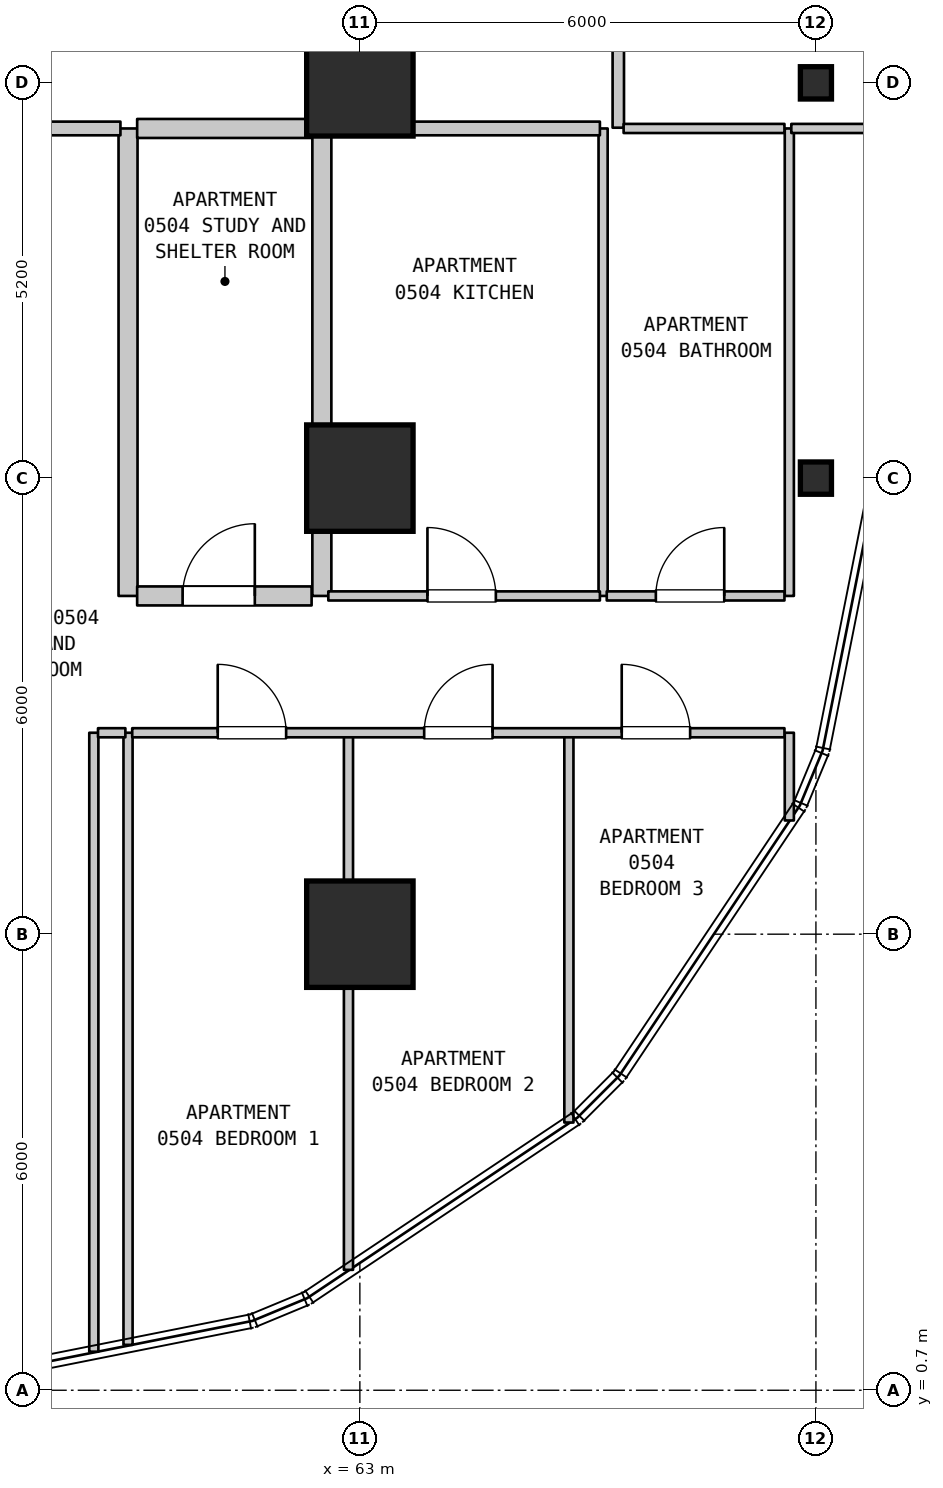
"""IFC4 building model, lengths in metres.
Left out: names, types, materials, properties, quantities, classifications, styles, units other than length and angle.
Written with IfcOpenShell. Run it as: python <this file> out.ifc"""

import sys

from ifc_helpers import new_model, si_unit, direction, frame, frame_2d, origin, origin_2d, place, context, subcontext, project, spatial, rectangle, i_section, extrude, element, fill, save


model = new_model("IFC4")
c1 = context("Model", 3, precision=1e-05, world=origin(), true_north=direction((0.0, 1.0)))
c2 = subcontext(c1, "Body", "Model", "MODEL_VIEW")
j1 = project(units=[si_unit("LENGTHUNIT", "METRE"), si_unit("PLANEANGLEUNIT", "RADIAN")], contexts=[c1])
p1 = place(None, origin())
s1 = spatial("IfcSite", under=j1, at=p1, CompositionType="ELEMENT")
p2 = place(p1, origin())
s2 = spatial("IfcBuilding", under=s1, at=p2, CompositionType="ELEMENT")
p3 = place(p2, frame((0.0, 0.0, 27.7)))
s3 = spatial("IfcBuildingStorey", under=s2, at=p3, CompositionType="ELEMENT", Elevation=27.7)
for number, where, z_axis, x_axis in (
    (1, (63.0, 6.7, 0.0), (0.0, 0.0, 1.0), (1.0, 0.0, 0.0)),
    (2, (63.0, 12.7, 0.0), (0.0, 0.0, 1.0), (1.0, 0.0, 0.0)),
    (3, (63.0, 17.9, 0.0), (0.0, 0.0, 1.0), (1.0, 0.0, 0.0)),
):
    element("IfcColumn", number, at=place(p3, frame(where, z_axis=z_axis, x_axis=x_axis)), inside=s3, PredefinedType="COLUMN", context=c2, shape_type="SweptSolid", body=[
        extrude(rectangle(XDim=1.4, YDim=1.4, at=origin_2d()), origin(), (0.0, 0.0, 1.0), 3.7),
    ])
for number, where, z_axis, x_axis in (
    (4, (69.0, 12.7, 0.0), (0.0, 0.0, 1.0), (1.0, 0.0, 0.0)),
    (5, (69.0, 17.9, 0.0), (0.0, 0.0, 1.0), (1.0, 0.0, 0.0)),
):
    element("IfcColumn", number, at=place(p3, frame(where, z_axis=z_axis, x_axis=x_axis)), inside=s3, PredefinedType="COLUMN", context=c2, shape_type="SweptSolid", body=[
        extrude(i_section(OverallWidth=0.409, OverallDepth=0.425, WebThickness=0.032, FlangeThickness=0.052, FilletRadius=0.015, at=origin_2d()), origin(), (0.0, 0.0, 1.0), 3.7),
    ])
p4 = place(p3, frame((59.5, 1.207, 0.0), z_axis=(0.0, 0.0, 1.0), x_axis=(0.0, 1.0, 0.0)))
e6 = element("IfcWall", 6, at=p4, inside=s3, PredefinedType="PARTITIONING", context=c2, shape_type="SweptSolid", body=[
    extrude(rectangle(XDim=8.143, YDim=0.12, at=frame_2d((4.072, 0.0))), origin(), (0.0, 0.0, 1.0), 3.385),
])
p5 = place(p3, frame((59.95, 1.297, 0.0), z_axis=(0.0, 0.0, 1.0), x_axis=(0.0, 1.0, 0.0)))
e7 = element("IfcWall", 7, at=p5, inside=s3, PredefinedType="PARTITIONING", context=c2, shape_type="SweptSolid", body=[
    extrude(rectangle(XDim=8.053, YDim=0.12, at=frame_2d((4.026, 0.0))), origin(), (0.0, 0.0, 1.0), 3.385),
])
for number, where, z_axis, x_axis in (
    (8, (59.95, 11.15, 0.0), (0.0, 0.0, 1.0), (0.0, 1.0, 0.0)),
    (9, (62.5, 11.15, 0.0), (0.0, 0.0, 1.0), (0.0, 1.0, 0.0)),
):
    element("IfcWall", number, at=place(p3, frame(where, z_axis=z_axis, x_axis=x_axis)), inside=s3, PredefinedType="STANDARD", context=c2, shape_type="SweptSolid", body=[
        extrude(rectangle(XDim=6.15, YDim=0.25, at=frame_2d((3.075, 0.0))), origin(), (0.0, 0.0, 1.0), 3.385),
    ])
p6 = place(p3, frame((62.85, 2.284, 0.0), z_axis=(0.0, 0.0, 1.0), x_axis=(0.0, 1.0, 0.0)))
e10 = element("IfcWall", 10, at=p6, inside=s3, PredefinedType="PARTITIONING", context=c2, shape_type="SweptSolid", body=[
    extrude(rectangle(XDim=7.066, YDim=0.12, at=frame_2d((3.533, 0.0))), origin(), (0.0, 0.0, 1.0), 3.385),
])
p7 = place(p3, frame((65.75, 4.222, 0.0), z_axis=(0.0, 0.0, 1.0), x_axis=(0.0, 1.0, 0.0)))
e11 = element("IfcWall", 11, at=p7, inside=s3, PredefinedType="PARTITIONING", context=c2, shape_type="SweptSolid", body=[
    extrude(rectangle(XDim=5.128, YDim=0.12, at=frame_2d((2.564, 0.0))), origin(), (0.0, 0.0, 1.0), 3.385),
])
p8 = place(p3, frame((66.2, 11.15, 0.0), z_axis=(0.0, 0.0, 1.0), x_axis=(0.0, 1.0, 0.0)))
e12 = element("IfcWall", 12, at=p8, inside=s3, PredefinedType="PARTITIONING", context=c2, shape_type="SweptSolid", body=[
    extrude(rectangle(XDim=6.15, YDim=0.12, at=frame_2d((3.075, 0.0))), origin(), (0.0, 0.0, 1.0), 3.385),
])
p9 = place(p3, frame((66.4, 17.31, 0.0), z_axis=(0.0, 0.0, 1.0), x_axis=(0.0, 1.0, 0.0)))
e13 = element("IfcWall", 13, at=p9, inside=s3, PredefinedType="STANDARD", context=c2, shape_type="SweptSolid", body=[
    extrude(rectangle(XDim=2.34, YDim=0.15, at=frame_2d((1.17, 0.0))), origin(), (0.0, 0.0, 1.0), 3.385),
])
p10 = place(p3, frame((68.65, 8.196, 0.0), z_axis=(0.0, 0.0, 1.0), x_axis=(0.0, 1.0, 0.0)))
e14 = element("IfcWall", 14, at=p10, inside=s3, PredefinedType="PARTITIONING", context=c2, shape_type="SweptSolid", body=[
    extrude(rectangle(XDim=1.154, YDim=0.12, at=frame_2d((0.577, 0.0))), origin(), (0.0, 0.0, 1.0), 3.385),
])
p11 = place(p3, frame((68.65, 11.15, 0.0), z_axis=(0.0, 0.0, 1.0), x_axis=(0.0, 1.0, 0.0)))
e15 = element("IfcWall", 15, at=p11, inside=s3, PredefinedType="PARTITIONING", context=c2, shape_type="SweptSolid", body=[
    extrude(rectangle(XDim=6.15, YDim=0.12, at=frame_2d((3.075, 0.0))), origin(), (0.0, 0.0, 1.0), 3.385),
])
p12 = place(p3, frame((59.555, 9.35, 0.0), z_axis=(0.0, 0.0, 1.0), x_axis=(1.0, 0.0, 0.0)))
e16 = element("IfcWall", 16, at=p12, inside=s3, PredefinedType="PARTITIONING", context=c2, shape_type="SweptSolid", body=[
    extrude(rectangle(XDim=0.36, YDim=0.12, at=frame_2d((0.18, 0.0))), origin(), (0.0, 0.0, 1.0), 3.385),
])
p13 = place(p3, frame((60.005, 9.35, 0.0), z_axis=(0.0, 0.0, 1.0), x_axis=(1.0, 0.0, 0.0)))
e17 = element("IfcWall", 17, at=p13, inside=s3, PredefinedType="PARTITIONING", context=c2, shape_type="SweptSolid", body=[
    extrude(rectangle(XDim=8.581, YDim=0.12, at=frame_2d((4.291, 0.0))), origin(), (0.0, 0.0, 1.0), 3.385),
])
p14 = place(p13, frame((1.125, 0.0, 0.0)))
e18 = element("IfcOpeningElement", 18, at=p14, cuts=e17, PredefinedType="OPENING", context=c2, shape_type="SweptSolid", body=[
    extrude(rectangle(XDim=0.9, YDim=2.15, at=frame_2d((0.45, 1.075))), frame((0.0, 0.07, 0.0), z_axis=(0.0, -1.0, 0.0), x_axis=(1.0, 0.0, 0.0)), (0.0, 0.0, 1.0), 0.14),
])
p15 = place(p13, frame((3.841, 0.0, 0.0)))
e19 = element("IfcOpeningElement", 19, at=p15, cuts=e17, PredefinedType="OPENING", context=c2, shape_type="SweptSolid", body=[
    extrude(rectangle(XDim=0.9, YDim=2.15, at=frame_2d((0.45, 1.075))), frame((0.0, 0.07, 0.0), z_axis=(0.0, -1.0, 0.0), x_axis=(1.0, 0.0, 0.0)), (0.0, 0.0, 1.0), 0.14),
])
p16 = place(p13, frame((6.44, 0.0, 0.0)))
e20 = element("IfcOpeningElement", 20, at=p16, cuts=e17, PredefinedType="OPENING", context=c2, shape_type="SweptSolid", body=[
    extrude(rectangle(XDim=0.9, YDim=2.15, at=frame_2d((0.45, 1.075))), frame((0.0, 0.07, 0.0), z_axis=(0.0, -1.0, 0.0), x_axis=(1.0, 0.0, 0.0)), (0.0, 0.0, 1.0), 0.14),
])
p17 = place(p3, frame((60.07, 11.15, 0.0), z_axis=(0.0, 0.0, 1.0), x_axis=(1.0, 0.0, 0.0)))
e21 = element("IfcWall", 21, at=p17, inside=s3, PredefinedType="STANDARD", context=c2, shape_type="SweptSolid", body=[
    extrude(rectangle(XDim=2.295, YDim=0.25, at=frame_2d((1.147, 0.0))), origin(), (0.0, 0.0, 1.0), 3.385),
])
p18 = place(p17, frame((0.598, 0.0, 0.0)))
e22 = element("IfcOpeningElement", 22, at=p18, cuts=e21, PredefinedType="OPENING", context=c2, shape_type="SweptSolid", body=[
    extrude(rectangle(XDim=0.95, YDim=2.15, at=frame_2d((0.475, 1.075))), frame((0.0, 0.135, 0.0), z_axis=(0.0, -1.0, 0.0), x_axis=(1.0, 0.0, 0.0)), (0.0, 0.0, 1.0), 0.27),
])
p19 = place(p3, frame((62.585, 11.15, 0.0), z_axis=(0.0, 0.0, 1.0), x_axis=(1.0, 0.0, 0.0)))
e23 = element("IfcWall", 23, at=p19, inside=s3, PredefinedType="PARTITIONING", context=c2, shape_type="SweptSolid", body=[
    extrude(rectangle(XDim=3.573, YDim=0.12, at=frame_2d((1.787, 0.0))), origin(), (0.0, 0.0, 1.0), 3.385),
])
p20 = place(p19, frame((1.304, 0.0, 0.0)))
e24 = element("IfcOpeningElement", 24, at=p20, cuts=e23, PredefinedType="OPENING", context=c2, shape_type="SweptSolid", body=[
    extrude(rectangle(XDim=0.9, YDim=2.15, at=frame_2d((0.45, 1.075))), frame((0.0, 0.07, 0.0), z_axis=(0.0, -1.0, 0.0), x_axis=(1.0, 0.0, 0.0)), (0.0, 0.0, 1.0), 0.14),
])
p21 = place(p3, frame((66.248, 11.15, 0.0), z_axis=(0.0, 0.0, 1.0), x_axis=(1.0, 0.0, 0.0)))
e25 = element("IfcWall", 25, at=p21, inside=s3, PredefinedType="PARTITIONING", context=c2, shape_type="SweptSolid", body=[
    extrude(rectangle(XDim=2.338, YDim=0.12, at=frame_2d((1.169, 0.0))), origin(), (0.0, 0.0, 1.0), 3.385),
])
p22 = place(p21, frame((0.646, 0.0, 0.0)))
e26 = element("IfcOpeningElement", 26, at=p22, cuts=e25, PredefinedType="OPENING", context=c2, shape_type="SweptSolid", body=[
    extrude(rectangle(XDim=0.9, YDim=2.1, at=frame_2d((0.45, 1.05))), frame((0.0, 0.07, 0.0), z_axis=(0.0, -1.0, 0.0), x_axis=(1.0, 0.0, 0.0)), (0.0, 0.0, 1.0), 0.14),
])
p23 = place(p3, frame((54.305, 17.3, 0.0), z_axis=(0.0, 0.0, 1.0), x_axis=(1.0, 0.0, 0.0)))
e27 = element("IfcWall", 27, at=p23, inside=s3, PredefinedType="STANDARD", context=c2, shape_type="SweptSolid", body=[
    extrude(rectangle(XDim=5.545, YDim=0.18, at=frame_2d((2.772, 0.0))), origin(), (0.0, 0.0, 1.0), 3.385),
])
p24 = place(p23, frame((3.56, 0.0, 0.0)))
e28 = element("IfcOpeningElement", 28, at=p24, cuts=e27, PredefinedType="OPENING", context=c2, shape_type="SweptSolid", body=[
    extrude(rectangle(XDim=1.0, YDim=2.15, at=frame_2d((0.5, 1.075))), frame((0.0, 0.1, 0.0), z_axis=(0.0, -1.0, 0.0), x_axis=(1.0, 0.0, 0.0)), (0.0, 0.0, 1.0), 0.2),
])
p25 = place(p3, frame((60.07, 17.3, 0.0), z_axis=(0.0, 0.0, 1.0), x_axis=(1.0, 0.0, 0.0)))
e29 = element("IfcWall", 29, at=p25, inside=s3, PredefinedType="STANDARD", context=c2, shape_type="SweptSolid", body=[
    extrude(rectangle(XDim=2.295, YDim=0.25, at=frame_2d((1.147, 0.0))), origin(), (0.0, 0.0, 1.0), 3.385),
])
p26 = place(p3, frame((62.585, 17.3, 0.0), z_axis=(0.0, 0.0, 1.0), x_axis=(1.0, 0.0, 0.0)))
e30 = element("IfcWall", 30, at=p26, inside=s3, PredefinedType="STANDARD", context=c2, shape_type="SweptSolid", body=[
    extrude(rectangle(XDim=3.573, YDim=0.18, at=frame_2d((1.787, 0.0))), origin(), (0.0, 0.0, 1.0), 3.385),
])
p27 = place(p3, frame((66.47, 17.3, 0.0), z_axis=(0.0, 0.0, 1.0), x_axis=(1.0, 0.0, 0.0)))
e31 = element("IfcWall", 31, at=p27, inside=s3, PredefinedType="PARTITIONING", context=c2, shape_type="SweptSolid", body=[
    extrude(rectangle(XDim=2.116, YDim=0.12, at=frame_2d((1.058, 0.0))), origin(), (0.0, 0.0, 1.0), 3.385),
])
p28 = place(p3, frame((68.676, 17.3, 0.0), z_axis=(0.0, 0.0, 1.0), x_axis=(1.0, 0.0, 0.0)))
e32 = element("IfcWall", 32, at=p28, inside=s3, PredefinedType="PARTITIONING", context=c2, shape_type="SweptSolid", body=[
    extrude(rectangle(XDim=1.314, YDim=0.12, at=frame_2d((0.657, 0.0))), origin(), (0.0, 0.0, 1.0), 3.385),
])
p29 = place(p14, origin())
e33 = element("IfcDoor", 33, at=p29, inside=s3, OperationType="SINGLE_SWING_LEFT", PredefinedType="DOOR", context=c2, shape_type="SweptSolid", body=[
    extrude(rectangle(XDim=0.9, YDim=2.15, at=frame_2d((0.45, 1.075))), frame((0.0, 0.025, 0.0), z_axis=(0.0, -1.0, 0.0), x_axis=(1.0, 0.0, 0.0)), (0.0, 0.0, 1.0), 0.05),
])
fill(e18, e33)
p30 = place(p15, origin())
e34 = element("IfcDoor", 34, at=p30, inside=s3, OperationType="SINGLE_SWING_RIGHT", PredefinedType="DOOR", context=c2, shape_type="SweptSolid", body=[
    extrude(rectangle(XDim=0.9, YDim=2.15, at=frame_2d((0.45, 1.075))), frame((0.0, 0.025, 0.0), z_axis=(0.0, -1.0, 0.0), x_axis=(1.0, 0.0, 0.0)), (0.0, 0.0, 1.0), 0.05),
])
fill(e19, e34)
p31 = place(p16, origin())
e35 = element("IfcDoor", 35, at=p31, inside=s3, OperationType="SINGLE_SWING_LEFT", PredefinedType="DOOR", context=c2, shape_type="SweptSolid", body=[
    extrude(rectangle(XDim=0.9, YDim=2.15, at=frame_2d((0.45, 1.075))), frame((0.0, 0.025, 0.0), z_axis=(0.0, -1.0, 0.0), x_axis=(1.0, 0.0, 0.0)), (0.0, 0.0, 1.0), 0.05),
])
fill(e20, e35)
p32 = place(p18, origin())
e36 = element("IfcDoor", 36, at=p32, inside=s3, OperationType="SINGLE_SWING_RIGHT", PredefinedType="DOOR", context=c2, shape_type="SweptSolid", body=[
    extrude(rectangle(XDim=0.95, YDim=2.15, at=frame_2d((0.475, 1.075))), frame((0.0, 0.025, 0.0), z_axis=(0.0, -1.0, 0.0), x_axis=(1.0, 0.0, 0.0)), (0.0, 0.0, 1.0), 0.05),
])
fill(e22, e36)
p33 = place(p20, origin())
e37 = element("IfcDoor", 37, at=p33, inside=s3, OperationType="SINGLE_SWING_LEFT", PredefinedType="DOOR", context=c2, shape_type="SweptSolid", body=[
    extrude(rectangle(XDim=0.9, YDim=2.15, at=frame_2d((0.45, 1.075))), frame((0.0, 0.025, 0.0), z_axis=(0.0, -1.0, 0.0), x_axis=(1.0, 0.0, 0.0)), (0.0, 0.0, 1.0), 0.05),
])
fill(e24, e37)
p34 = place(p22, origin())
e38 = element("IfcDoor", 38, at=p34, inside=s3, OperationType="SINGLE_SWING_RIGHT", PredefinedType="DOOR", context=c2, shape_type="SweptSolid", body=[
    extrude(rectangle(XDim=0.9, YDim=2.1, at=frame_2d((0.45, 1.05))), frame((0.0, 0.025, 0.0), z_axis=(0.0, -1.0, 0.0), x_axis=(1.0, 0.0, 0.0)), (0.0, 0.0, 1.0), 0.05),
])
fill(e26, e38)
save(model, sys.argv[1])
